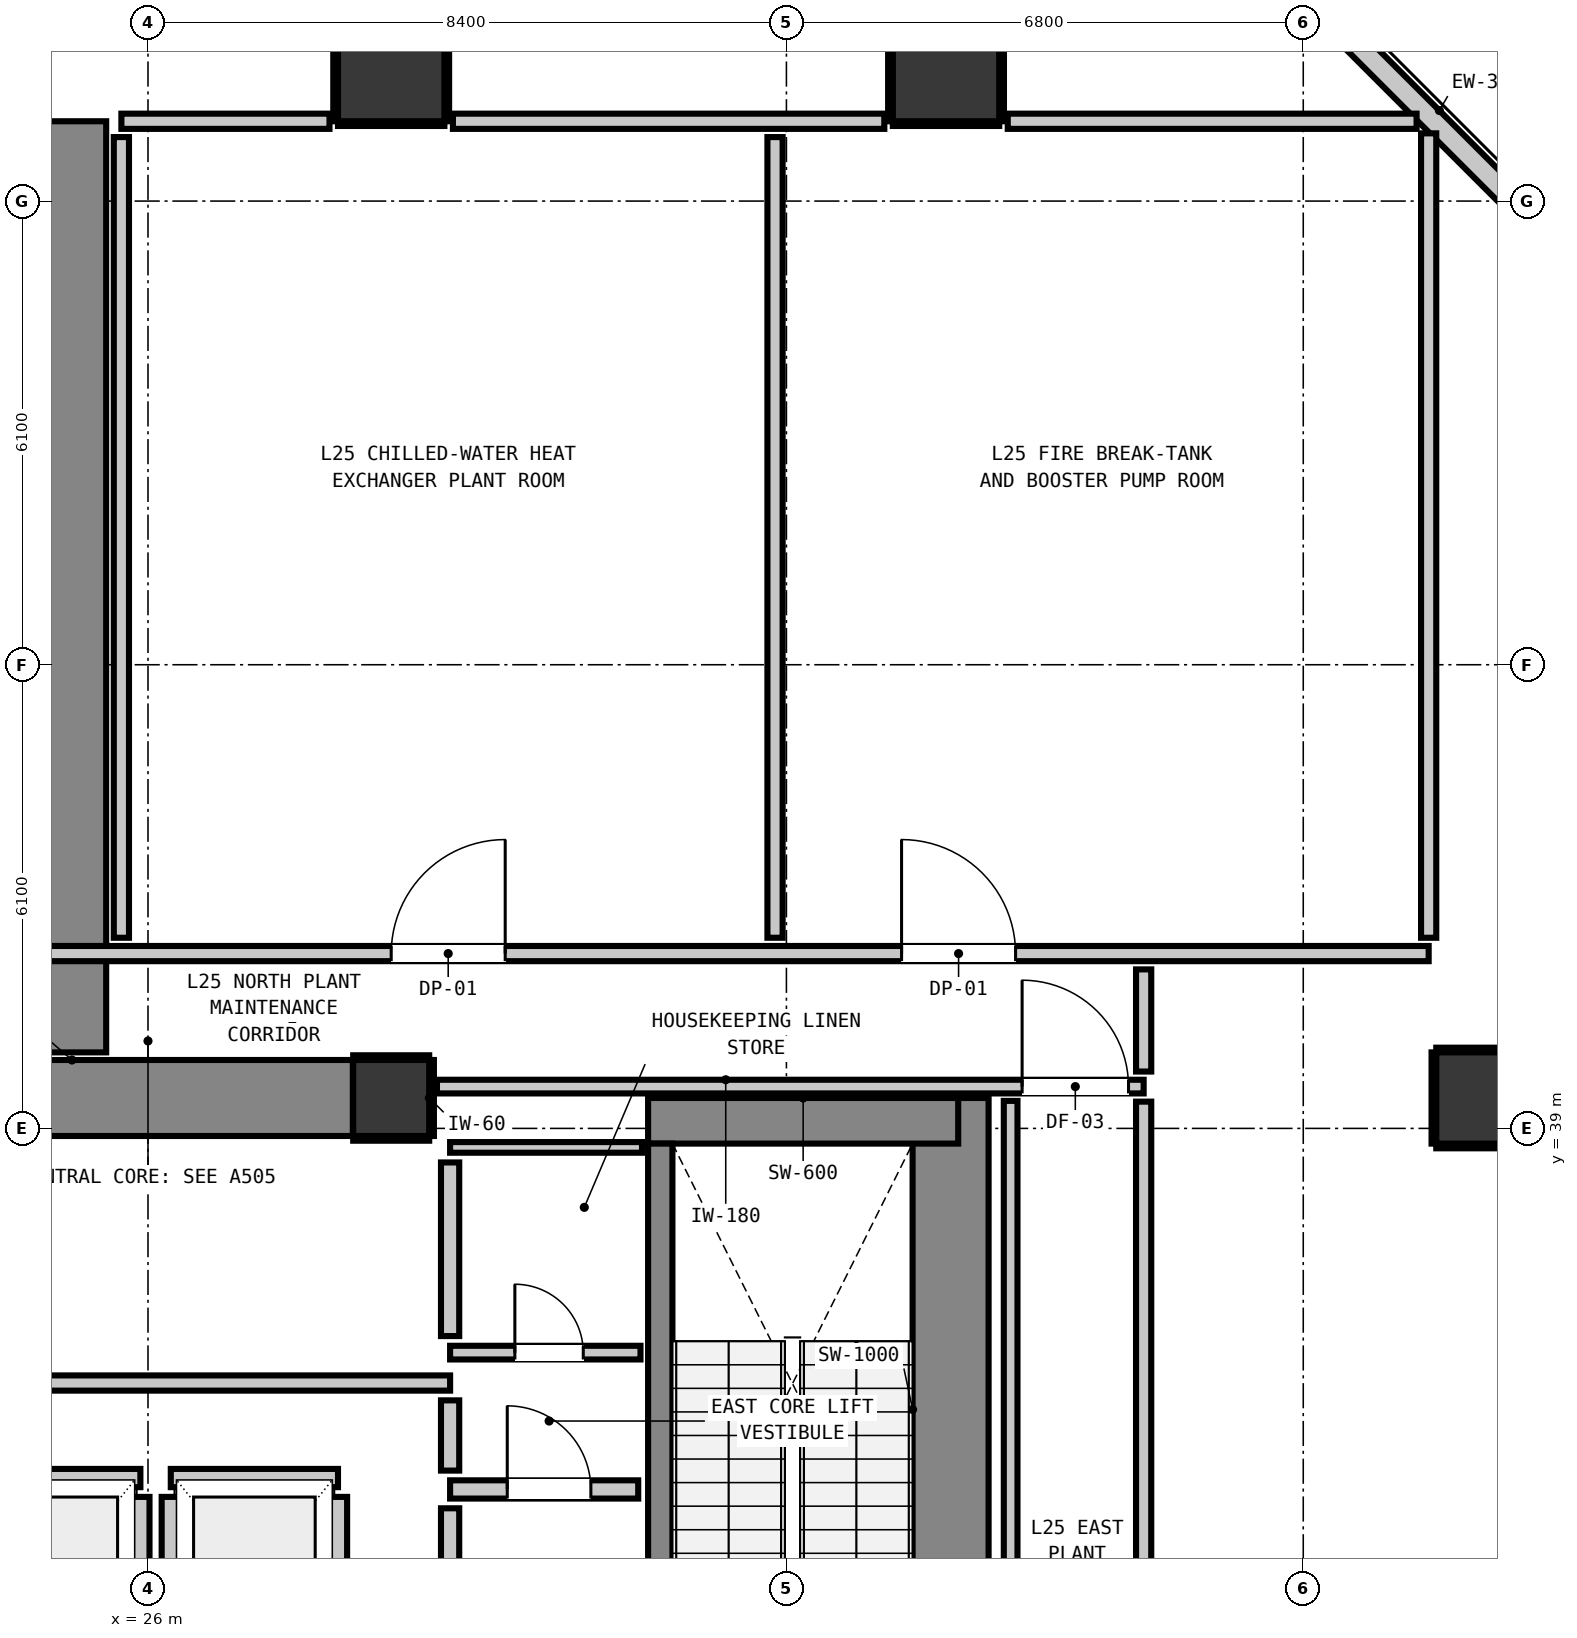
"""IFC4 building model, lengths in metres.
Left out: names, types, materials, properties, quantities, classifications, styles, units other than length and angle.
Written with IfcOpenShell. Run it as: python <this file> out.ifc"""

import sys

from ifc_helpers import new_model, si_unit, direction, frame, frame_2d, origin, origin_2d, place, context, subcontext, project, spatial, rectangle, extrude, element, fill, save


model = new_model("IFC4")
c1 = context("Model", 3, precision=1e-05, world=origin(), true_north=direction((0.0, 1.0)))
c2 = subcontext(c1, "Body", "Model", "MODEL_VIEW")
j1 = project(units=[si_unit("LENGTHUNIT", "METRE"), si_unit("PLANEANGLEUNIT", "RADIAN")], contexts=[c1])
p1 = place(None, origin())
s1 = spatial("IfcSite", under=j1, at=p1, CompositionType="ELEMENT")
p2 = place(p1, origin())
s2 = spatial("IfcBuilding", under=s1, at=p2, CompositionType="ELEMENT")
p3 = place(p2, frame((0.0, 0.0, 88.4)))
s3 = spatial("IfcBuildingStorey", under=s2, at=p3, CompositionType="ELEMENT", Elevation=88.4)
p4 = place(p3, frame((29.2, 39.4, 0.0), z_axis=(0.0, 0.0, 1.0), x_axis=(1.0, 0.0, 0.0)))
e1 = element("IfcColumn", 1, at=p4, inside=s3, PredefinedType="COLUMN", context=c2, shape_type="SweptSolid", body=[
    extrude(rectangle(XDim=1.0, YDim=1.0, at=origin_2d()), origin(), (0.0, 0.0, 1.0), 4.4),
])
p5 = place(p3, frame((36.56, 31.205, 0.0), z_axis=(0.0, 0.0, 1.0), x_axis=(0.0, 1.0, 0.0)))
e2 = element("IfcWall", 2, at=p5, inside=s3, PredefinedType="SHEAR", context=c2, shape_type="SweptSolid", body=[
    extrude(rectangle(XDim=8.195, YDim=1.0, at=frame_2d((4.097, 0.0))), origin(), (0.0, 0.0, 1.0), 4.4),
])
p6 = place(p3, frame((32.58, 39.1, 0.0), z_axis=(0.0, 0.0, 1.0), x_axis=(1.0, 0.0, 0.0)))
e3 = element("IfcWall", 3, at=p6, inside=s3, PredefinedType="SHEAR", context=c2, shape_type="SweptSolid", body=[
    extrude(rectangle(XDim=4.08, YDim=0.6, at=frame_2d((2.04, 0.0))), origin(), (0.0, 0.0, 1.0), 4.4),
])
p7 = place(p3, frame((21.305, 39.4, 0.0), z_axis=(0.0, 0.0, 1.0), x_axis=(1.0, 0.0, 0.0)))
e4 = element("IfcWall", 4, at=p7, inside=s3, PredefinedType="SHEAR", context=c2, shape_type="SweptSolid", body=[
    extrude(rectangle(XDim=7.39, YDim=1.0, at=frame_2d((3.695, 0.0))), origin(), (0.0, 0.0, 1.0), 4.4),
])
p8 = place(p3, frame((32.74, 31.0, 0.0), z_axis=(0.0, 0.0, 1.0), x_axis=(0.0, 1.0, 0.0)))
e5 = element("IfcWall", 5, at=p8, inside=s3, PredefinedType="SHEAR", context=c2, shape_type="SweptSolid", body=[
    extrude(rectangle(XDim=7.8, YDim=0.32, at=frame_2d((3.9, 0.0))), origin(), (0.0, 0.0, 1.0), 4.4),
])
p9 = place(p8, frame((0.19, 0.0, 0.0)))
e6 = element("IfcOpeningElement", 6, at=p9, cuts=e5, PredefinedType="OPENING", context=c2, shape_type="SweptSolid", body=[
    extrude(rectangle(XDim=1.1, YDim=2.15, at=frame_2d((0.55, 1.075))), frame((0.0, 0.17, 0.0), z_axis=(0.0, -1.0, 0.0), x_axis=(1.0, 0.0, 0.0)), (0.0, 0.0, 1.0), 0.34),
])
for number, where, z_axis, x_axis in (
    (7, (29.2, 52.95, 0.0), (0.0, 0.0, 1.0), (1.0, 0.0, 0.0)),
    (8, (36.5, 52.95, 0.0), (0.0, 0.0, 1.0), (1.0, 0.0, 0.0)),
):
    element("IfcColumn", number, at=place(p3, frame(where, z_axis=z_axis, x_axis=x_axis)), inside=s3, PredefinedType="COLUMN", context=c2, shape_type="SweptSolid", body=[
        extrude(rectangle(XDim=1.4, YDim=1.4, at=origin_2d()), origin(), (0.0, 0.0, 1.0), 4.4),
    ])
p10 = place(p3, frame((43.55, 39.4, 0.0), z_axis=(0.0, 0.0, 1.0), x_axis=(1.0, 0.0, 0.0)))
e9 = element("IfcColumn", 9, at=p10, inside=s3, PredefinedType="COLUMN", context=c2, shape_type="SweptSolid", body=[
    extrude(rectangle(XDim=1.2, YDim=1.2, at=origin_2d()), origin(), (0.0, 0.0, 1.0), 4.4),
])
p11 = place(p3, frame((25.0, 40.0, 0.0), z_axis=(0.0, 0.0, 1.0), x_axis=(0.0, 1.0, 0.0)))
e10 = element("IfcWall", 10, at=p11, inside=s3, PredefinedType="SHEAR", context=c2, shape_type="SweptSolid", body=[
    extrude(rectangle(XDim=12.25, YDim=0.9, at=frame_2d((6.125, 0.0))), origin(), (0.0, 0.0, 1.0), 4.14),
])
p12 = place(p3, frame((41.635, 53.535, 0.0), z_axis=(0.0, 0.0, 1.0), x_axis=(0.707106781187, -0.707106781187, 0.0)))
e11 = element("IfcWall", 11, at=p12, inside=s3, PredefinedType="STANDARD", context=c2, shape_type="SweptSolid", body=[
    extrude(rectangle(XDim=3.536, YDim=0.3, at=frame_2d((1.768, 0.0))), origin(), (0.0, 0.0, 1.0), 4.14),
])
p13 = place(p3, frame((23.7, 34.4, 0.0), z_axis=(0.0, 0.0, 1.0), x_axis=(1.0, 0.0, 0.0)))
e12 = element("IfcWall", 12, at=p13, inside=s3, PredefinedType="PARTITIONING", context=c2, shape_type="SweptSolid", body=[
    extrude(rectangle(XDim=2.2, YDim=0.24, at=frame_2d((1.1, 0.0))), origin(), (0.0, 0.0, 1.0), 4.14),
])
p14 = place(p3, frame((25.9, 32.048, 0.0), z_axis=(0.0, 0.0, 1.0), x_axis=(0.0, 1.0, 0.0)))
e13 = element("IfcWall", 13, at=p14, inside=s3, PredefinedType="PARTITIONING", context=c2, shape_type="SweptSolid", body=[
    extrude(rectangle(XDim=2.104, YDim=0.24, at=frame_2d((1.052, 0.0))), origin(), (0.0, 0.0, 1.0), 4.14),
])
p15 = place(p3, frame((26.3, 34.4, 0.0), z_axis=(0.0, 0.0, 1.0), x_axis=(1.0, 0.0, 0.0)))
e14 = element("IfcWall", 14, at=p15, inside=s3, PredefinedType="PARTITIONING", context=c2, shape_type="SweptSolid", body=[
    extrude(rectangle(XDim=2.2, YDim=0.24, at=frame_2d((1.1, 0.0))), origin(), (0.0, 0.0, 1.0), 4.14),
])
for number, where, z_axis, x_axis in (
    (15, (26.3, 32.048, 0.0), (0.0, 0.0, 1.0), (0.0, 1.0, 0.0)),
    (16, (28.5, 32.048, 0.0), (0.0, 0.0, 1.0), (0.0, 1.0, 0.0)),
):
    element("IfcWall", number, at=place(p3, frame(where, z_axis=z_axis, x_axis=x_axis)), inside=s3, PredefinedType="PARTITIONING", context=c2, shape_type="SweptSolid", body=[
        extrude(rectangle(XDim=2.104, YDim=0.24, at=frame_2d((1.052, 0.0))), origin(), (0.0, 0.0, 1.0), 4.14),
    ])
p16 = place(p3, frame((29.975, 34.25, 0.0), z_axis=(0.0, 0.0, 1.0), x_axis=(1.0, 0.0, 0.0)))
e17 = element("IfcWall", 17, at=p16, inside=s3, PredefinedType="PARTITIONING", context=c2, shape_type="SweptSolid", body=[
    extrude(rectangle(XDim=2.475, YDim=0.24, at=frame_2d((1.237, 0.0))), origin(), (0.0, 0.0, 1.0), 4.14),
])
p17 = place(p16, frame((0.752, 0.0, 0.0)))
e18 = element("IfcOpeningElement", 18, at=p17, cuts=e17, PredefinedType="OPENING", context=c2, shape_type="SweptSolid", body=[
    extrude(rectangle(XDim=1.1, YDim=2.15, at=frame_2d((0.55, 1.075))), frame((0.0, 0.13, 0.0), z_axis=(0.0, -1.0, 0.0), x_axis=(1.0, 0.0, 0.0)), (0.0, 0.0, 1.0), 0.26),
])
p18 = place(p3, frame((18.95, 35.65, 0.0), z_axis=(0.0, 0.0, 1.0), x_axis=(1.0, 0.0, 0.0)))
e19 = element("IfcWall", 19, at=p18, inside=s3, PredefinedType="PARTITIONING", context=c2, shape_type="SweptSolid", body=[
    extrude(rectangle(XDim=11.025, YDim=0.2, at=frame_2d((5.513, 0.0))), origin(), (0.0, 0.0, 1.0), 4.14),
])
p19 = place(p3, frame((2.95, 41.3, 0.0), z_axis=(0.0, 0.0, 1.0), x_axis=(1.0, 0.0, 0.0)))
e20 = element("IfcWall", 20, at=p19, inside=s3, PredefinedType="PARTITIONING", context=c2, shape_type="SweptSolid", body=[
    extrude(rectangle(XDim=39.9, YDim=0.2, at=frame_2d((19.95, 0.0))), origin(), (0.0, 0.0, 1.0), 4.14),
])
p20 = place(p19, frame((26.25, 0.0, 0.0)))
e21 = element("IfcOpeningElement", 21, at=p20, cuts=e20, PredefinedType="OPENING", context=c2, shape_type="SweptSolid", body=[
    extrude(rectangle(XDim=1.5, YDim=2.15, at=frame_2d((0.75, 1.075))), frame((0.0, 0.11, 0.0), z_axis=(0.0, -1.0, 0.0), x_axis=(1.0, 0.0, 0.0)), (0.0, 0.0, 1.0), 0.22),
])
p21 = place(p19, frame((32.965, 0.0, 0.0)))
e22 = element("IfcOpeningElement", 22, at=p21, cuts=e20, PredefinedType="OPENING", context=c2, shape_type="SweptSolid", body=[
    extrude(rectangle(XDim=1.5, YDim=2.15, at=frame_2d((0.75, 1.075))), frame((0.0, 0.11, 0.0), z_axis=(0.0, -1.0, 0.0), x_axis=(1.0, 0.0, 0.0)), (0.0, 0.0, 1.0), 0.22),
])
p22 = place(p19, frame((13.885, 0.0, 0.0)))
e23 = element("IfcOpeningElement", 23, at=p22, cuts=e20, PredefinedType="OPENING", context=c2, shape_type="SweptSolid", body=[
    extrude(rectangle(XDim=1.5, YDim=2.15, at=frame_2d((0.75, 1.075))), frame((0.0, 0.11, 0.0), z_axis=(0.0, -1.0, 0.0), x_axis=(1.0, 0.0, 0.0)), (0.0, 0.0, 1.0), 0.22),
])
p23 = place(p3, frame((25.65, 52.25, 0.0), z_axis=(0.0, 0.0, 1.0), x_axis=(1.0, 0.0, 0.0)))
e24 = element("IfcWall", 24, at=p23, inside=s3, PredefinedType="PARTITIONING", context=c2, shape_type="SweptSolid", body=[
    extrude(rectangle(XDim=2.738, YDim=0.2, at=frame_2d((1.369, 0.0))), origin(), (0.0, 0.0, 1.0), 4.14),
])
p24 = place(p3, frame((30.012, 52.25, 0.0), z_axis=(0.0, 0.0, 1.0), x_axis=(1.0, 0.0, 0.0)))
e25 = element("IfcWall", 25, at=p24, inside=s3, PredefinedType="PARTITIONING", context=c2, shape_type="SweptSolid", body=[
    extrude(rectangle(XDim=5.676, YDim=0.2, at=frame_2d((2.838, 0.0))), origin(), (0.0, 0.0, 1.0), 4.14),
])
p25 = place(p3, frame((37.312, 52.25, 0.0), z_axis=(0.0, 0.0, 1.0), x_axis=(1.0, 0.0, 0.0)))
e26 = element("IfcWall", 26, at=p25, inside=s3, PredefinedType="PARTITIONING", context=c2, shape_type="SweptSolid", body=[
    extrude(rectangle(XDim=5.379, YDim=0.2, at=frame_2d((2.689, 0.0))), origin(), (0.0, 0.0, 1.0), 4.14),
])
p26 = place(p3, frame((29.975, 36.05, 0.0), z_axis=(0.0, 0.0, 1.0), x_axis=(1.0, 0.0, 0.0)))
e27 = element("IfcWall", 27, at=p26, inside=s3, PredefinedType="PARTITIONING", context=c2, shape_type="SweptSolid", body=[
    extrude(rectangle(XDim=2.505, YDim=0.18, at=frame_2d((1.252, 0.0))), origin(), (0.0, 0.0, 1.0), 4.14),
])
p27 = place(p26, frame((0.852, 0.0, 0.0)))
e28 = element("IfcOpeningElement", 28, at=p27, cuts=e27, PredefinedType="OPENING", context=c2, shape_type="SweptSolid", body=[
    extrude(rectangle(XDim=0.9, YDim=2.1, at=frame_2d((0.45, 1.05))), frame((0.0, 0.1, 0.0), z_axis=(0.0, -1.0, 0.0), x_axis=(1.0, 0.0, 0.0)), (0.0, 0.0, 1.0), 0.2),
])
p28 = place(p3, frame((29.802, 39.55, 0.0), z_axis=(0.0, 0.0, 1.0), x_axis=(1.0, 0.0, 0.0)))
e29 = element("IfcWall", 29, at=p28, inside=s3, PredefinedType="PARTITIONING", context=c2, shape_type="SweptSolid", body=[
    extrude(rectangle(XDim=9.298, YDim=0.18, at=frame_2d((4.649, 0.0))), origin(), (0.0, 0.0, 1.0), 3.878),
])
p29 = place(p28, frame((7.699, 0.0, 0.0)))
e30 = element("IfcOpeningElement", 30, at=p29, cuts=e29, PredefinedType="OPENING", context=c2, shape_type="SweptSolid", body=[
    extrude(rectangle(XDim=1.4, YDim=2.15, at=frame_2d((0.7, 1.075))), frame((0.0, 0.1, 0.0), z_axis=(0.0, -1.0, 0.0), x_axis=(1.0, 0.0, 0.0)), (0.0, 0.0, 1.0), 0.2),
])
p30 = place(p3, frame((29.975, 38.75, 0.0), z_axis=(0.0, 0.0, 1.0), x_axis=(1.0, 0.0, 0.0)))
e31 = element("IfcWall", 31, at=p30, inside=s3, PredefinedType="PARTITIONING", context=c2, shape_type="SweptSolid", body=[
    extrude(rectangle(XDim=2.525, YDim=0.14, at=frame_2d((1.262, 0.0))), origin(), (0.0, 0.0, 1.0), 4.14),
])
p31 = place(p3, frame((29.975, 29.768, 0.0), z_axis=(0.0, 0.0, 1.0), x_axis=(0.0, 1.0, 0.0)))
e32 = element("IfcWall", 32, at=p31, inside=s3, PredefinedType="PARTITIONING", context=c2, shape_type="SweptSolid", body=[
    extrude(rectangle(XDim=4.234, YDim=0.24, at=frame_2d((2.117, 0.0))), origin(), (0.0, 0.0, 1.0), 4.14),
])
p32 = place(p31, frame((1.582, 0.0, 0.0)))
e33 = element("IfcOpeningElement", 33, at=p32, cuts=e32, PredefinedType="OPENING", context=c2, shape_type="SweptSolid", body=[
    extrude(rectangle(XDim=1.1, YDim=2.15, at=frame_2d((0.55, 1.075))), frame((0.0, 0.13, 0.0), z_axis=(0.0, -1.0, 0.0), x_axis=(1.0, 0.0, 0.0)), (0.0, 0.0, 1.0), 0.26),
])
p33 = place(p3, frame((29.975, 34.498, 0.0), z_axis=(0.0, 0.0, 1.0), x_axis=(0.0, 1.0, 0.0)))
e34 = element("IfcWall", 34, at=p33, inside=s3, PredefinedType="PARTITIONING", context=c2, shape_type="SweptSolid", body=[
    extrude(rectangle(XDim=0.924, YDim=0.24, at=frame_2d((0.462, 0.0))), origin(), (0.0, 0.0, 1.0), 4.14),
])
p34 = place(p3, frame((29.975, 36.268, 0.0), z_axis=(0.0, 0.0, 1.0), x_axis=(0.0, 1.0, 0.0)))
e35 = element("IfcWall", 35, at=p34, inside=s3, PredefinedType="PARTITIONING", context=c2, shape_type="SweptSolid", body=[
    extrude(rectangle(XDim=2.284, YDim=0.24, at=frame_2d((1.142, 0.0))), origin(), (0.0, 0.0, 1.0), 4.14),
])
for number, where, z_axis, x_axis in (
    (36, (25.65, 41.508, 0.0), (0.0, 0.0, 1.0), (0.0, 1.0, 0.0)),
    (37, (34.25, 41.508, 0.0), (0.0, 0.0, 1.0), (0.0, 1.0, 0.0)),
):
    element("IfcWall", number, at=place(p3, frame(where, z_axis=z_axis, x_axis=x_axis)), inside=s3, PredefinedType="PARTITIONING", context=c2, shape_type="SweptSolid", body=[
        extrude(rectangle(XDim=10.534, YDim=0.2, at=frame_2d((5.267, 0.0))), origin(), (0.0, 0.0, 1.0), 4.14),
    ])
p35 = place(p3, frame((39.1, 30.008, 0.0), z_axis=(0.0, 0.0, 1.0), x_axis=(0.0, 1.0, 0.0)))
e38 = element("IfcWall", 38, at=p35, inside=s3, PredefinedType="PARTITIONING", context=c2, shape_type="SweptSolid", body=[
    extrude(rectangle(XDim=9.344, YDim=0.2, at=frame_2d((4.672, 0.0))), origin(), (0.0, 0.0, 1.0), 4.14),
])
p36 = place(p3, frame((39.1, 39.748, 0.0), z_axis=(0.0, 0.0, 1.0), x_axis=(0.0, 1.0, 0.0)))
e39 = element("IfcWall", 39, at=p36, inside=s3, PredefinedType="PARTITIONING", context=c2, shape_type="SweptSolid", body=[
    extrude(rectangle(XDim=1.344, YDim=0.2, at=frame_2d((0.672, 0.0))), origin(), (0.0, 0.0, 1.0), 4.14),
])
p37 = place(p3, frame((42.85, 41.508, 0.0), z_axis=(0.0, 0.0, 1.0), x_axis=(0.0, 1.0, 0.0)))
e40 = element("IfcWall", 40, at=p37, inside=s3, PredefinedType="PARTITIONING", context=c2, shape_type="SweptSolid", body=[
    extrude(rectangle(XDim=10.583, YDim=0.2, at=frame_2d((5.292, 0.0))), origin(), (0.0, 0.0, 1.0), 3.525),
])
p38 = place(p3, frame((37.35, 22.068, 0.0), z_axis=(0.0, 0.0, 1.0), x_axis=(0.0, 1.0, 0.0)))
e41 = element("IfcWall", 41, at=p38, inside=s3, PredefinedType="PARTITIONING", context=c2, shape_type="SweptSolid", body=[
    extrude(rectangle(XDim=17.294, YDim=0.18, at=frame_2d((8.647, 0.0))), origin(), (0.0, 0.0, 1.0), 4.14),
])
for number, where, z_axis, x_axis in (
    (42, (28.7, 38.868, 0.0), (0.0, 0.0, 1.0), (1.0, 0.0, 0.0)),
    (43, (28.7, 39.932, 0.0), (0.0, 0.0, 1.0), (1.0, 0.0, 0.0)),
    (44, (29.732, 38.9, 0.0), (0.0, 0.0, 1.0), (0.0, 1.0, 0.0)),
):
    element("IfcWall", number, at=place(p3, frame(where, z_axis=z_axis, x_axis=x_axis)), inside=s3, PredefinedType="PARTITIONING", context=c2, shape_type="SweptSolid", body=[
        extrude(rectangle(XDim=1.0, YDim=0.06, at=frame_2d((0.5, 0.0))), origin(), (0.0, 0.0, 1.0), 1.45),
    ])
p39 = place(p3, frame((28.5, 52.218, 0.0), z_axis=(0.0, 0.0, 1.0), x_axis=(1.0, 0.0, 0.0)))
e45 = element("IfcWall", 45, at=p39, inside=s3, PredefinedType="PARTITIONING", context=c2, shape_type="SweptSolid", body=[
    extrude(rectangle(XDim=1.4, YDim=0.06, at=frame_2d((0.7, 0.0))), origin(), (0.0, 0.0, 1.0), 1.45),
])
for number, where, z_axis, x_axis in (
    (46, (28.468, 52.25, 0.0), (0.0, 0.0, 1.0), (0.0, 1.0, 0.0)),
    (47, (29.932, 52.25, 0.0), (0.0, 0.0, 1.0), (0.0, 1.0, 0.0)),
):
    element("IfcWall", number, at=place(p3, frame(where, z_axis=z_axis, x_axis=x_axis)), inside=s3, PredefinedType="PARTITIONING", context=c2, shape_type="SweptSolid", body=[
        extrude(rectangle(XDim=1.12, YDim=0.06, at=frame_2d((0.56, 0.0))), origin(), (0.0, 0.0, 1.0), 1.45),
    ])
p40 = place(p3, frame((35.8, 52.218, 0.0), z_axis=(0.0, 0.0, 1.0), x_axis=(1.0, 0.0, 0.0)))
e48 = element("IfcWall", 48, at=p40, inside=s3, PredefinedType="PARTITIONING", context=c2, shape_type="SweptSolid", body=[
    extrude(rectangle(XDim=1.4, YDim=0.06, at=frame_2d((0.7, 0.0))), origin(), (0.0, 0.0, 1.0), 1.45),
])
for number, where, z_axis, x_axis in (
    (49, (35.768, 52.25, 0.0), (0.0, 0.0, 1.0), (0.0, 1.0, 0.0)),
    (50, (37.232, 52.25, 0.0), (0.0, 0.0, 1.0), (0.0, 1.0, 0.0)),
):
    element("IfcWall", number, at=place(p3, frame(where, z_axis=z_axis, x_axis=x_axis)), inside=s3, PredefinedType="PARTITIONING", context=c2, shape_type="SweptSolid", body=[
        extrude(rectangle(XDim=1.12, YDim=0.06, at=frame_2d((0.56, 0.0))), origin(), (0.0, 0.0, 1.0), 1.45),
    ])
for number, where, z_axis, x_axis in (
    (51, (42.95, 38.768, 0.0), (0.0, 0.0, 1.0), (1.0, 0.0, 0.0)),
    (52, (42.95, 40.032, 0.0), (0.0, 0.0, 1.0), (1.0, 0.0, 0.0)),
):
    element("IfcWall", number, at=place(p3, frame(where, z_axis=z_axis, x_axis=x_axis)), inside=s3, PredefinedType="PARTITIONING", context=c2, shape_type="SweptSolid", body=[
        extrude(rectangle(XDim=1.02, YDim=0.06, at=frame_2d((0.51, 0.0))), origin(), (0.0, 0.0, 1.0), 1.45),
    ])
p41 = place(p3, frame((42.918, 38.8, 0.0), z_axis=(0.0, 0.0, 1.0), x_axis=(0.0, 1.0, 0.0)))
e53 = element("IfcWall", 53, at=p41, inside=s3, PredefinedType="PARTITIONING", context=c2, shape_type="SweptSolid", body=[
    extrude(rectangle(XDim=1.2, YDim=0.06, at=frame_2d((0.6, 0.0))), origin(), (0.0, 0.0, 1.0), 1.45),
])
p42 = place(p17, origin())
e54 = element("IfcDoor", 54, at=p42, inside=s3, OperationType="SINGLE_SWING_LEFT", PredefinedType="DOOR", context=c2, shape_type="SweptSolid", body=[
    extrude(rectangle(XDim=1.1, YDim=2.15, at=frame_2d((0.55, 1.075))), frame((0.0, 0.025, 0.0), z_axis=(0.0, -1.0, 0.0), x_axis=(1.0, 0.0, 0.0)), (0.0, 0.0, 1.0), 0.05),
])
fill(e18, e54)
p43 = place(p29, origin())
e55 = element("IfcDoor", 55, at=p43, inside=s3, OperationType="SINGLE_SWING_LEFT", PredefinedType="DOOR", context=c2, shape_type="SweptSolid", body=[
    extrude(rectangle(XDim=1.4, YDim=2.15, at=frame_2d((0.7, 1.075))), frame((0.0, 0.025, 0.0), z_axis=(0.0, -1.0, 0.0), x_axis=(1.0, 0.0, 0.0)), (0.0, 0.0, 1.0), 0.05),
])
fill(e30, e55)
p44 = place(p27, origin())
e56 = element("IfcDoor", 56, at=p44, inside=s3, OperationType="SINGLE_SWING_LEFT", PredefinedType="DOOR", context=c2, shape_type="SweptSolid", body=[
    extrude(rectangle(XDim=0.9, YDim=2.1, at=frame_2d((0.45, 1.05))), frame((0.0, 0.025, 0.0), z_axis=(0.0, -1.0, 0.0), x_axis=(1.0, 0.0, 0.0)), (0.0, 0.0, 1.0), 0.05),
])
fill(e28, e56)
p45 = place(p20, origin())
e57 = element("IfcDoor", 57, at=p45, inside=s3, OperationType="SINGLE_SWING_RIGHT", PredefinedType="DOOR", context=c2, shape_type="SweptSolid", body=[
    extrude(rectangle(XDim=1.5, YDim=2.15, at=frame_2d((0.75, 1.075))), frame((0.0, 0.025, 0.0), z_axis=(0.0, -1.0, 0.0), x_axis=(1.0, 0.0, 0.0)), (0.0, 0.0, 1.0), 0.05),
])
fill(e21, e57)
p46 = place(p21, origin())
e58 = element("IfcDoor", 58, at=p46, inside=s3, OperationType="SINGLE_SWING_LEFT", PredefinedType="DOOR", context=c2, shape_type="SweptSolid", body=[
    extrude(rectangle(XDim=1.5, YDim=2.15, at=frame_2d((0.75, 1.075))), frame((0.0, 0.025, 0.0), z_axis=(0.0, -1.0, 0.0), x_axis=(1.0, 0.0, 0.0)), (0.0, 0.0, 1.0), 0.05),
])
fill(e22, e58)
save(model, sys.argv[1])
